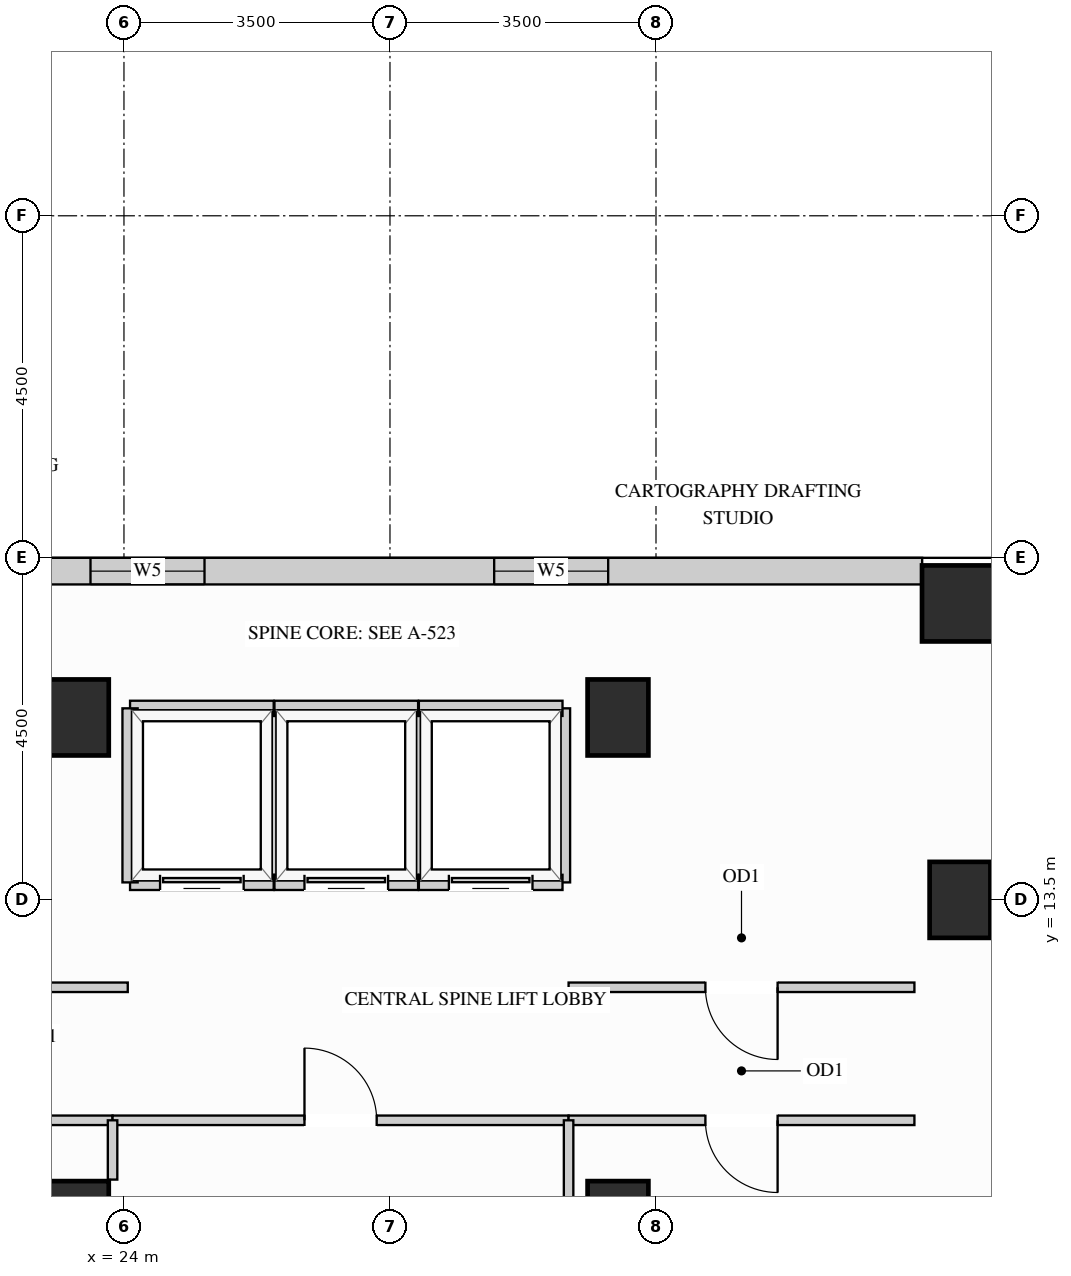
"""IFC4 building model, lengths in metres.
Left out: names, types, materials, properties, quantities, classifications, styles, units other than length and angle.
Written with IfcOpenShell. Run it as: python <this file> out.ifc"""

import sys

from ifc_helpers import new_model, si_unit, direction, frame, frame_2d, origin, origin_2d, place, context, subcontext, project, spatial, rectangle, extrude, source, transform, mapped, element, fill, save


model = new_model("IFC4")
c1 = context("Model", 3, precision=1e-05, world=origin(), true_north=direction((0.0, 1.0)))
c2 = subcontext(c1, "Body", "Model", "MODEL_VIEW")
j1 = project(units=[si_unit("LENGTHUNIT", "METRE"), si_unit("PLANEANGLEUNIT", "RADIAN")], contexts=[c1])
p1 = place(None, origin())
s1 = spatial("IfcSite", under=j1, at=p1, CompositionType="ELEMENT")
p2 = place(p1, origin())
s2 = spatial("IfcBuilding", under=s1, at=p2, CompositionType="ELEMENT")
p3 = place(p2, frame((0.0, 0.0, 150.3)))
s3 = spatial("IfcBuildingStorey", under=s2, at=p3, CompositionType="ELEMENT", Elevation=150.3)
m1 = source(origin(), c2, "Body", "SweptSolid", [
    extrude(rectangle(XDim=0.8, YDim=1.0, at=origin_2d()), origin(), (0.0, 0.0, 1.0), 3.4),
])
for number, where, z_axis, x_axis in (
    (1, (35.0, 13.5, 0.0), (0.0, 0.0, 1.0), (1.0, 0.0, 0.0)),
    (2, (23.4, 15.9, 0.0), (0.0, 0.0, 1.0), (1.0, 0.0, 0.0)),
    (3, (23.4, 9.3, 0.0), (0.0, 0.0, 1.0), (1.0, 0.0, 0.0)),
    (4, (30.5, 15.9, 0.0), (0.0, 0.0, 1.0), (1.0, 0.0, 0.0)),
    (5, (30.5, 9.3, 0.0), (0.0, 0.0, 1.0), (1.0, 0.0, 0.0)),
):
    element("IfcColumn", number, at=place(p3, frame(where, z_axis=z_axis, x_axis=x_axis)), inside=s3, PredefinedType="COLUMN", context=c2, shape_type="MappedRepresentation", body=[
        mapped(m1, transform((0.0, 0.0, 0.0), x_axis=(1.0, 0.0, 0.0), y_axis=(0.0, 1.0, 0.0), z_axis=(0.0, 0.0, 1.0))),
    ])
m2 = source(origin(), c2, "Body", "SweptSolid", [
    extrude(rectangle(XDim=1.0, YDim=1.0, at=origin_2d()), origin(), (0.0, 0.0, 1.0), 3.4),
])
p4 = place(p3, frame((35.0, 17.4, 0.0), z_axis=(0.0, 0.0, 1.0), x_axis=(1.0, 0.0, 0.0)))
e6 = element("IfcColumn", 6, at=p4, inside=s3, PredefinedType="COLUMN", context=c2, shape_type="MappedRepresentation", body=[
    mapped(m2, transform((0.0, 0.0, 0.0), x_axis=(1.0, 0.0, 0.0), y_axis=(0.0, 1.0, 0.0), z_axis=(0.0, 0.0, 1.0))),
])
p5 = place(p3, frame((34.502, 17.825, 0.0), z_axis=(0.0, 0.0, 1.0), x_axis=(-1.0, 0.0, 0.0)))
e7 = element("IfcWall", 7, at=p5, inside=s3, PredefinedType="SOLIDWALL", context=c2, shape_type="SweptSolid", body=[
    extrude(rectangle(XDim=15.104, YDim=0.35, at=frame_2d((7.552, 0.0))), origin(), (0.0, 0.0, 1.0), 3.385),
])
p6 = place(p5, frame((4.131, 0.0, 0.78)))
e8 = element("IfcOpeningElement", 8, at=p6, cuts=e7, PredefinedType="OPENING", context=c2, shape_type="SweptSolid", body=[
    extrude(rectangle(XDim=1.5, YDim=2.0, at=frame_2d((0.75, 1.0))), frame((0.0, 0.185, 0.0), z_axis=(0.0, -1.0, 0.0), x_axis=(1.0, 0.0, 0.0)), (0.0, 0.0, 1.0), 0.37),
])
p7 = place(p5, frame((9.442, 0.0, 0.78)))
e9 = element("IfcOpeningElement", 9, at=p7, cuts=e7, PredefinedType="OPENING", context=c2, shape_type="SweptSolid", body=[
    extrude(rectangle(XDim=1.5, YDim=2.0, at=frame_2d((0.75, 1.0))), frame((0.0, 0.185, 0.0), z_axis=(0.0, -1.0, 0.0), x_axis=(1.0, 0.0, 0.0)), (0.0, 0.0, 1.0), 0.37),
])
p8 = place(p3, frame((29.85, 12.35, 0.0), z_axis=(0.0, 0.0, 1.0), x_axis=(1.0, 0.0, 0.0)))
e10 = element("IfcWall", 10, at=p8, inside=s3, PredefinedType="PARTITIONING", context=c2, shape_type="SweptSolid", body=[
    extrude(rectangle(XDim=4.55, YDim=0.125, at=frame_2d((2.275, 0.0))), origin(), (0.0, 0.0, 1.0), 3.385),
])
p9 = place(p8, frame((1.8, 0.0, 0.0)))
e11 = element("IfcOpeningElement", 11, at=p9, cuts=e10, PredefinedType="OPENING", context=c2, shape_type="SweptSolid", body=[
    extrude(rectangle(XDim=0.95, YDim=2.15, at=frame_2d((0.475, 1.075))), frame((0.0, 0.073, 0.0), z_axis=(0.0, -1.0, 0.0), x_axis=(1.0, 0.0, 0.0)), (0.0, 0.0, 1.0), 0.145),
])
p10 = place(p3, frame((19.5, 12.35, 0.0), z_axis=(0.0, 0.0, 1.0), x_axis=(1.0, 0.0, 0.0)))
e12 = element("IfcWall", 12, at=p10, inside=s3, PredefinedType="PARTITIONING", context=c2, shape_type="SweptSolid", body=[
    extrude(rectangle(XDim=4.55, YDim=0.125, at=frame_2d((2.275, 0.0))), origin(), (0.0, 0.0, 1.0), 3.385),
])
p11 = place(p10, frame((1.8, 0.0, 0.0)))
e13 = element("IfcOpeningElement", 13, at=p11, cuts=e12, PredefinedType="OPENING", context=c2, shape_type="SweptSolid", body=[
    extrude(rectangle(XDim=0.95, YDim=2.15, at=frame_2d((0.475, 1.075))), frame((0.0, 0.073, 0.0), z_axis=(0.0, -1.0, 0.0), x_axis=(1.0, 0.0, 0.0)), (0.0, 0.0, 1.0), 0.145),
])
p12 = place(p3, frame((19.5, 10.6, 0.0), z_axis=(0.0, 0.0, 1.0), x_axis=(1.0, 0.0, 0.0)))
e14 = element("IfcWall", 14, at=p12, inside=s3, PredefinedType="PARTITIONING", context=c2, shape_type="SweptSolid", body=[
    extrude(rectangle(XDim=4.35, YDim=0.125, at=frame_2d((2.175, 0.0))), origin(), (0.0, 0.0, 1.0), 3.385),
])
p13 = place(p12, frame((1.7, 0.0, 0.0)))
e15 = element("IfcOpeningElement", 15, at=p13, cuts=e14, PredefinedType="OPENING", context=c2, shape_type="SweptSolid", body=[
    extrude(rectangle(XDim=0.95, YDim=2.15, at=frame_2d((0.475, 1.075))), frame((0.0, 0.073, 0.0), z_axis=(0.0, -1.0, 0.0), x_axis=(1.0, 0.0, 0.0)), (0.0, 0.0, 1.0), 0.145),
])
p14 = place(p3, frame((23.85, 10.6, 0.0), z_axis=(0.0, 0.0, 1.0), x_axis=(1.0, 0.0, 0.0)))
e16 = element("IfcWall", 16, at=p14, inside=s3, PredefinedType="PARTITIONING", context=c2, shape_type="SweptSolid", body=[
    extrude(rectangle(XDim=6.0, YDim=0.125, at=frame_2d((3.0, 0.0))), origin(), (0.0, 0.0, 1.0), 3.385),
])
p15 = place(p14, frame((2.525, 0.0, 0.0)))
e17 = element("IfcOpeningElement", 17, at=p15, cuts=e16, PredefinedType="OPENING", context=c2, shape_type="SweptSolid", body=[
    extrude(rectangle(XDim=0.95, YDim=2.15, at=frame_2d((0.475, 1.075))), frame((0.0, 0.073, 0.0), z_axis=(0.0, -1.0, 0.0), x_axis=(1.0, 0.0, 0.0)), (0.0, 0.0, 1.0), 0.145),
])
p16 = place(p3, frame((29.85, 10.6, 0.0), z_axis=(0.0, 0.0, 1.0), x_axis=(1.0, 0.0, 0.0)))
e18 = element("IfcWall", 18, at=p16, inside=s3, PredefinedType="PARTITIONING", context=c2, shape_type="SweptSolid", body=[
    extrude(rectangle(XDim=4.55, YDim=0.125, at=frame_2d((2.275, 0.0))), origin(), (0.0, 0.0, 1.0), 3.385),
])
p17 = place(p16, frame((1.8, 0.0, 0.0)))
e19 = element("IfcOpeningElement", 19, at=p17, cuts=e18, PredefinedType="OPENING", context=c2, shape_type="SweptSolid", body=[
    extrude(rectangle(XDim=0.95, YDim=2.15, at=frame_2d((0.475, 1.075))), frame((0.0, 0.073, 0.0), z_axis=(0.0, -1.0, 0.0), x_axis=(1.0, 0.0, 0.0)), (0.0, 0.0, 1.0), 0.145),
])
m3 = source(origin(), c2, "Body", "SweptSolid", [
    extrude(rectangle(XDim=0.78, YDim=0.125, at=frame_2d((0.39, 0.0))), origin(), (0.0, 0.0, 1.0), 3.385),
])
p18 = place(p3, frame((23.85, 9.82, 0.0), z_axis=(0.0, 0.0, 1.0), x_axis=(0.0, 1.0, 0.0)))
e20 = element("IfcWall", 20, at=p18, inside=s3, PredefinedType="PARTITIONING", context=c2, shape_type="MappedRepresentation", body=[
    mapped(m3, transform((0.0, 0.0, 0.0), x_axis=(1.0, 0.0, 0.0), y_axis=(0.0, 1.0, 0.0), z_axis=(0.0, 0.0, 1.0))),
])
m4 = source(origin(), c2, "Body", "SweptSolid", [
    extrude(rectangle(XDim=5.748, YDim=0.125, at=frame_2d((2.874, 0.0))), origin(), (0.0, 0.0, 1.0), 3.385),
])
p19 = place(p3, frame((29.85, 4.852, 0.0), z_axis=(0.0, 0.0, 1.0), x_axis=(0.0, 1.0, 0.0)))
e21 = element("IfcWall", 21, at=p19, inside=s3, PredefinedType="PARTITIONING", context=c2, shape_type="MappedRepresentation", body=[
    mapped(m4, transform((0.0, 0.0, 0.0), x_axis=(1.0, 0.0, 0.0), y_axis=(0.0, 1.0, 0.0), z_axis=(0.0, 0.0, 1.0))),
])
m5 = source(origin(), c2, "Body", "SweptSolid", [
    extrude(rectangle(XDim=2.29, YDim=0.2, at=frame_2d((1.145, 0.0))), origin(), (0.0, 0.0, 1.0), 3.385),
])
p20 = place(p3, frame((25.97, 13.73, 0.0), z_axis=(0.0, 0.0, 1.0), x_axis=(0.0, 1.0, 0.0)))
e22 = element("IfcWall", 22, at=p20, inside=s3, PredefinedType="PARTITIONING", context=c2, shape_type="MappedRepresentation", body=[
    mapped(m5, transform((0.0, 0.0, 0.0), x_axis=(1.0, 0.0, 0.0), y_axis=(0.0, 1.0, 0.0), z_axis=(0.0, 0.0, 1.0))),
])
m6 = source(origin(), c2, "Body", "SweptSolid", [
    extrude(rectangle(XDim=1.89, YDim=0.2, at=frame_2d((0.945, 0.0))), origin(), (0.0, 0.0, 1.0), 2.773),
])
p21 = place(p3, frame((24.08, 16.02, 0.0), z_axis=(0.0, 0.0, 1.0), x_axis=(1.0, 0.0, 0.0)))
e23 = element("IfcWall", 23, at=p21, inside=s3, PredefinedType="PARTITIONING", context=c2, shape_type="MappedRepresentation", body=[
    mapped(m6, transform((0.0, 0.0, 0.0), x_axis=(1.0, 0.0, 0.0), y_axis=(0.0, 1.0, 0.0), z_axis=(0.0, 0.0, 1.0))),
])
p22 = place(p3, frame((24.08, 13.73, 0.0), z_axis=(0.0, 0.0, 1.0), x_axis=(1.0, 0.0, 0.0)))
e24 = element("IfcWall", 24, at=p22, inside=s3, PredefinedType="PARTITIONING", context=c2, shape_type="SweptSolid", body=[
    extrude(rectangle(XDim=1.89, YDim=0.2, at=frame_2d((0.945, 0.0))), origin(), (0.0, 0.0, 1.0), 2.466),
])
p23 = place(p22, frame((0.395, 0.0, 0.0)))
e25 = element("IfcOpeningElement", 25, at=p23, cuts=e24, PredefinedType="OPENING", context=c2, shape_type="SweptSolid", body=[
    extrude(rectangle(XDim=1.1, YDim=2.2, at=frame_2d((0.55, 1.1))), frame((0.0, 0.11, 0.0), z_axis=(0.0, -1.0, 0.0), x_axis=(1.0, 0.0, 0.0)), (0.0, 0.0, 1.0), 0.22),
])
for number, where, z_axis, x_axis in (
    (26, (24.08, 13.73, 0.0), (0.0, 0.0, 1.0), (0.0, 1.0, 0.0)),
    (27, (27.87, 13.73, 0.0), (0.0, 0.0, 1.0), (0.0, 1.0, 0.0)),
):
    element("IfcWall", number, at=place(p3, frame(where, z_axis=z_axis, x_axis=x_axis)), inside=s3, PredefinedType="PARTITIONING", context=c2, shape_type="MappedRepresentation", body=[
        mapped(m5, transform((0.0, 0.0, 0.0), x_axis=(1.0, 0.0, 0.0), y_axis=(0.0, 1.0, 0.0), z_axis=(0.0, 0.0, 1.0))),
    ])
m7 = source(origin(), c2, "Body", "SweptSolid", [
    extrude(rectangle(XDim=1.89, YDim=0.2, at=frame_2d((0.945, 0.0))), origin(), (0.0, 0.0, 1.0), 2.773),
])
p24 = place(p3, frame((25.98, 16.02, 0.0), z_axis=(0.0, 0.0, 1.0), x_axis=(1.0, 0.0, 0.0)))
e28 = element("IfcWall", 28, at=p24, inside=s3, PredefinedType="PARTITIONING", context=c2, shape_type="MappedRepresentation", body=[
    mapped(m7, transform((0.0, 0.0, 0.0), x_axis=(1.0, 0.0, 0.0), y_axis=(0.0, 1.0, 0.0), z_axis=(0.0, 0.0, 1.0))),
])
p25 = place(p3, frame((25.98, 13.73, 0.0), z_axis=(0.0, 0.0, 1.0), x_axis=(1.0, 0.0, 0.0)))
e29 = element("IfcWall", 29, at=p25, inside=s3, PredefinedType="PARTITIONING", context=c2, shape_type="SweptSolid", body=[
    extrude(rectangle(XDim=1.89, YDim=0.2, at=frame_2d((0.945, 0.0))), origin(), (0.0, 0.0, 1.0), 2.466),
])
p26 = place(p25, frame((0.395, 0.0, 0.0)))
e30 = element("IfcOpeningElement", 30, at=p26, cuts=e29, PredefinedType="OPENING", context=c2, shape_type="SweptSolid", body=[
    extrude(rectangle(XDim=1.1, YDim=2.2, at=frame_2d((0.55, 1.1))), frame((0.0, 0.11, 0.0), z_axis=(0.0, -1.0, 0.0), x_axis=(1.0, 0.0, 0.0)), (0.0, 0.0, 1.0), 0.22),
])
p27 = place(p3, frame((29.77, 13.73, 0.0), z_axis=(0.0, 0.0, 1.0), x_axis=(0.0, 1.0, 0.0)))
e31 = element("IfcWall", 31, at=p27, inside=s3, PredefinedType="PARTITIONING", context=c2, shape_type="MappedRepresentation", body=[
    mapped(m5, transform((0.0, 0.0, 0.0), x_axis=(1.0, 0.0, 0.0), y_axis=(0.0, 1.0, 0.0), z_axis=(0.0, 0.0, 1.0))),
])
p28 = place(p3, frame((27.88, 16.02, 0.0), z_axis=(0.0, 0.0, 1.0), x_axis=(1.0, 0.0, 0.0)))
e32 = element("IfcWall", 32, at=p28, inside=s3, PredefinedType="PARTITIONING", context=c2, shape_type="MappedRepresentation", body=[
    mapped(m7, transform((0.0, 0.0, 0.0), x_axis=(1.0, 0.0, 0.0), y_axis=(0.0, 1.0, 0.0), z_axis=(0.0, 0.0, 1.0))),
])
p29 = place(p3, frame((27.88, 13.73, 0.0), z_axis=(0.0, 0.0, 1.0), x_axis=(1.0, 0.0, 0.0)))
e33 = element("IfcWall", 33, at=p29, inside=s3, PredefinedType="PARTITIONING", context=c2, shape_type="SweptSolid", body=[
    extrude(rectangle(XDim=1.89, YDim=0.2, at=frame_2d((0.945, 0.0))), origin(), (0.0, 0.0, 1.0), 2.466),
])
p30 = place(p29, frame((0.395, 0.0, 0.0)))
e34 = element("IfcOpeningElement", 34, at=p30, cuts=e33, PredefinedType="OPENING", context=c2, shape_type="SweptSolid", body=[
    extrude(rectangle(XDim=1.1, YDim=2.2, at=frame_2d((0.55, 1.1))), frame((0.0, 0.11, 0.0), z_axis=(0.0, -1.0, 0.0), x_axis=(1.0, 0.0, 0.0)), (0.0, 0.0, 1.0), 0.22),
])
m8 = source(origin(), c2, "Body", "SweptSolid", [
    extrude(rectangle(XDim=1.1, YDim=2.2, at=frame_2d((0.55, 1.1))), frame((0.0, 0.025, 0.0), z_axis=(0.0, -1.0, 0.0), x_axis=(1.0, 0.0, 0.0)), (0.0, 0.0, 1.0), 0.05),
])
p31 = place(p23, origin())
e35 = element("IfcDoor", 35, at=p31, inside=s3, OperationType="SLIDING_TO_LEFT", PredefinedType="DOOR", context=c2, shape_type="MappedRepresentation", body=[
    mapped(m8, transform((0.0, 0.0, 0.0), x_axis=(1.0, 0.0, 0.0), y_axis=(0.0, 1.0, 0.0), z_axis=(0.0, 0.0, 1.0))),
])
fill(e25, e35)
p32 = place(p26, origin())
e36 = element("IfcDoor", 36, at=p32, inside=s3, OperationType="SLIDING_TO_LEFT", PredefinedType="DOOR", context=c2, shape_type="MappedRepresentation", body=[
    mapped(m8, transform((0.0, 0.0, 0.0), x_axis=(1.0, 0.0, 0.0), y_axis=(0.0, 1.0, 0.0), z_axis=(0.0, 0.0, 1.0))),
])
fill(e30, e36)
p33 = place(p30, origin())
e37 = element("IfcDoor", 37, at=p33, inside=s3, OperationType="SLIDING_TO_LEFT", PredefinedType="DOOR", context=c2, shape_type="MappedRepresentation", body=[
    mapped(m8, transform((0.0, 0.0, 0.0), x_axis=(1.0, 0.0, 0.0), y_axis=(0.0, 1.0, 0.0), z_axis=(0.0, 0.0, 1.0))),
])
fill(e34, e37)
m9 = source(origin(), c2, "Body", "SweptSolid", [
    extrude(rectangle(XDim=0.95, YDim=2.15, at=frame_2d((0.475, 1.075))), frame((0.0, 0.025, 0.0), z_axis=(0.0, -1.0, 0.0), x_axis=(1.0, 0.0, 0.0)), (0.0, 0.0, 1.0), 0.05),
])
p34 = place(p9, origin())
e38 = element("IfcDoor", 38, at=p34, inside=s3, OperationType="SINGLE_SWING_RIGHT", PredefinedType="DOOR", context=c2, shape_type="MappedRepresentation", body=[
    mapped(m9, transform((0.0, 0.0, 0.0), x_axis=(1.0, 0.0, 0.0), y_axis=(0.0, 1.0, 0.0), z_axis=(0.0, 0.0, 1.0))),
])
fill(e11, e38)
p35 = place(p15, origin())
e39 = element("IfcDoor", 39, at=p35, inside=s3, OperationType="SINGLE_SWING_LEFT", PredefinedType="DOOR", context=c2, shape_type="MappedRepresentation", body=[
    mapped(m9, transform((0.0, 0.0, 0.0), x_axis=(1.0, 0.0, 0.0), y_axis=(0.0, 1.0, 0.0), z_axis=(0.0, 0.0, 1.0))),
])
fill(e17, e39)
p36 = place(p17, origin())
e40 = element("IfcDoor", 40, at=p36, inside=s3, OperationType="SINGLE_SWING_RIGHT", PredefinedType="DOOR", context=c2, shape_type="MappedRepresentation", body=[
    mapped(m9, transform((0.0, 0.0, 0.0), x_axis=(1.0, 0.0, 0.0), y_axis=(0.0, 1.0, 0.0), z_axis=(0.0, 0.0, 1.0))),
])
fill(e19, e40)
m10 = source(origin(), c2, "Body", "SweptSolid", [
    extrude(rectangle(XDim=1.5, YDim=2.0, at=frame_2d((0.75, 1.0))), frame((0.0, 0.03, 0.0), z_axis=(0.0, -1.0, 0.0), x_axis=(1.0, 0.0, 0.0)), (0.0, 0.0, 1.0), 0.06),
])
p37 = place(p6, origin())
e41 = element("IfcWindow", 41, at=p37, inside=s3, PartitioningType="SINGLE_PANEL", PredefinedType="WINDOW", context=c2, shape_type="MappedRepresentation", body=[
    mapped(m10, transform((0.0, 0.0, 0.0), x_axis=(1.0, 0.0, 0.0), y_axis=(0.0, 1.0, 0.0), z_axis=(0.0, 0.0, 1.0))),
])
fill(e8, e41)
p38 = place(p7, origin())
e42 = element("IfcWindow", 42, at=p38, inside=s3, PartitioningType="SINGLE_PANEL", PredefinedType="WINDOW", context=c2, shape_type="MappedRepresentation", body=[
    mapped(m10, transform((0.0, 0.0, 0.0), x_axis=(1.0, 0.0, 0.0), y_axis=(0.0, 1.0, 0.0), z_axis=(0.0, 0.0, 1.0))),
])
fill(e9, e42)
save(model, sys.argv[1])
